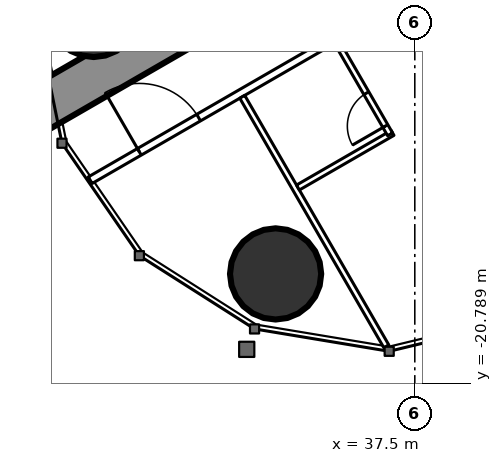
"""IFC4 building model, lengths in metres.
Left out: names, types, materials, properties, quantities, classifications, styles, units other than length and angle.
Written with IfcOpenShell. Run it as: python <this file> out.ifc"""

import sys

from ifc_helpers import new_model, si_unit, direction, frame, frame_2d, origin, origin_2d, place, context, subcontext, project, spatial, rectangle, circle, extrude, element, fill, save


model = new_model("IFC4")
c1 = context("Model", 3, precision=1e-05, world=origin(), true_north=direction((0.0, 1.0)))
c2 = subcontext(c1, "Body", "Model", "MODEL_VIEW")
j1 = project(units=[si_unit("LENGTHUNIT", "METRE"), si_unit("PLANEANGLEUNIT", "RADIAN")], contexts=[c1])
p1 = place(None, origin())
s1 = spatial("IfcSite", under=j1, at=p1, CompositionType="ELEMENT")
p2 = place(p1, origin())
s2 = spatial("IfcBuilding", under=s1, at=p2, CompositionType="ELEMENT")
p3 = place(p2, frame((0.0, 0.0, 236.9)))
s3 = spatial("IfcBuildingStorey", under=s2, at=p3, CompositionType="ELEMENT", Elevation=236.9)
for number, where, z_axis, x_axis in (
    (1, (33.837, -17.906, 0.0), (0.0, 0.0, 1.0), (1.0, 0.0, 0.0)),
    (2, (29.05, -11.0, 0.0), (0.0, 0.0, 1.0), (1.0, 0.0, 0.0)),
):
    element("IfcColumn", number, at=place(p3, frame(where, z_axis=z_axis, x_axis=x_axis)), inside=s3, PredefinedType="COLUMN", context=c2, shape_type="SweptSolid", body=[
        extrude(circle(Radius=1.2, at=origin_2d()), origin(), (0.0, 0.0, 1.0), 3.6),
    ])
p4 = place(p3, frame((27.2, -13.8, 0.0), z_axis=(0.0, 0.0, 1.0), x_axis=(0.866027159892, 0.499996958321, 0.0)))
e3 = element("IfcWall", 3, at=p4, inside=s3, PredefinedType="SHEAR", context=c2, shape_type="SweptSolid", body=[
    extrude(rectangle(XDim=27.947, YDim=1.2, at=frame_2d((13.973, 0.0))), origin(), (0.0, 0.0, 1.0), 3.6),
])
p5 = place(p4, frame((4.6, 0.0, 0.0)))
e4 = element("IfcOpeningElement", 4, at=p5, cuts=e3, PredefinedType="OPENING", context=c2, shape_type="SweptSolid", body=[
    extrude(rectangle(XDim=1.0, YDim=2.2, at=frame_2d((0.5, 1.1))), frame((0.0, 0.61, 0.0), z_axis=(0.0, -1.0, 0.0), x_axis=(1.0, 0.0, 0.0)), (0.0, 0.0, 1.0), 1.22),
])
p6 = place(p4, frame((13.395, 0.0, 0.0)))
e5 = element("IfcOpeningElement", 5, at=p6, cuts=e3, PredefinedType="OPENING", context=c2, shape_type="SweptSolid", body=[
    extrude(rectangle(XDim=1.8, YDim=2.2, at=frame_2d((0.9, 1.1))), frame((0.0, 0.61, 0.0), z_axis=(0.0, -1.0, 0.0), x_axis=(1.0, 0.0, 0.0)), (0.0, 0.0, 1.0), 1.22),
])
p7 = place(p3, frame((28.959, -15.44, 0.0), z_axis=(0.0, 0.0, 1.0), x_axis=(0.866025227435, 0.500000305447, 0.0)))
e6 = element("IfcWall", 6, at=p7, inside=s3, PredefinedType="PARTITIONING", context=c2, shape_type="SweptSolid", body=[
    extrude(rectangle(XDim=30.88, YDim=0.2, at=frame_2d((15.44, 0.0))), origin(), (0.0, 0.0, 1.0), 3.35),
])
p8 = place(p7, frame((1.494, 0.0, 0.0)))
e7 = element("IfcOpeningElement", 7, at=p8, cuts=e6, PredefinedType="OPENING", context=c2, shape_type="SweptSolid", body=[
    extrude(rectangle(XDim=1.8, YDim=2.03, at=frame_2d((0.9, 1.015))), frame((0.0, 0.11, 0.0), z_axis=(0.0, -1.0, 0.0), x_axis=(1.0, 0.0, 0.0)), (0.0, 0.0, 1.0), 0.22),
])
p9 = place(p7, frame((7.687, 0.0, 0.0)))
e8 = element("IfcOpeningElement", 8, at=p9, cuts=e6, PredefinedType="OPENING", context=c2, shape_type="SweptSolid", body=[
    extrude(rectangle(XDim=1.0, YDim=2.2, at=frame_2d((0.5, 1.1))), frame((0.0, 0.11, 0.0), z_axis=(0.0, -1.0, 0.0), x_axis=(1.0, 0.0, 0.0)), (0.0, 0.0, 1.0), 0.22),
])
p10 = place(p7, frame((16.137, 0.0, 0.0)))
e9 = element("IfcOpeningElement", 9, at=p10, cuts=e6, PredefinedType="OPENING", context=c2, shape_type="SweptSolid", body=[
    extrude(rectangle(XDim=0.95, YDim=2.2, at=frame_2d((0.475, 1.1))), frame((0.0, 0.11, 0.0), z_axis=(0.0, -1.0, 0.0), x_axis=(1.0, 0.0, 0.0)), (0.0, 0.0, 1.0), 0.22),
])
p11 = place(p7, frame((20.021, 0.0, 0.0)))
e10 = element("IfcOpeningElement", 10, at=p11, cuts=e6, PredefinedType="OPENING", context=c2, shape_type="SweptSolid", body=[
    extrude(rectangle(XDim=0.95, YDim=2.2, at=frame_2d((0.475, 1.1))), frame((0.0, 0.11, 0.0), z_axis=(0.0, -1.0, 0.0), x_axis=(1.0, 0.0, 0.0)), (0.0, 0.0, 1.0), 0.22),
])
p12 = place(p7, frame((26.253, 0.0, 0.0)))
e11 = element("IfcOpeningElement", 11, at=p12, cuts=e6, PredefinedType="OPENING", context=c2, shape_type="SweptSolid", body=[
    extrude(rectangle(XDim=0.95, YDim=2.2, at=frame_2d((0.475, 1.1))), frame((0.0, 0.11, 0.0), z_axis=(0.0, -1.0, 0.0), x_axis=(1.0, 0.0, 0.0)), (0.0, 0.0, 1.0), 0.22),
])
p13 = place(p3, frame((32.96, -13.246, 0.0), z_axis=(0.0, 0.0, 1.0), x_axis=(0.500000236886, -0.866025267018, 0.0)))
e12 = element("IfcWall", 12, at=p13, inside=s3, PredefinedType="PARTITIONING", context=c2, shape_type="SweptSolid", body=[
    extrude(rectangle(XDim=7.583, YDim=0.15, at=frame_2d((3.791, 0.0))), origin(), (0.0, 0.0, 1.0), 3.35),
])
p14 = place(p3, frame((34.425, -15.633, 0.0), z_axis=(0.0, 0.0, 1.0), x_axis=(0.866018712932, 0.500011588718, 0.0)))
e13 = element("IfcWall", 13, at=p14, inside=s3, PredefinedType="PARTITIONING", context=c2, shape_type="SweptSolid", body=[
    extrude(rectangle(XDim=2.875, YDim=0.15, at=frame_2d((1.438, 0.0))), origin(), (0.0, 0.0, 1.0), 3.35),
])
p15 = place(p3, frame((35.45, -11.808, 0.0), z_axis=(0.0, 0.0, 1.0), x_axis=(0.49994636267, -0.866056369097, 0.0)))
e14 = element("IfcWall", 14, at=p15, inside=s3, PredefinedType="PARTITIONING", context=c2, shape_type="SweptSolid", body=[
    extrude(rectangle(XDim=2.8, YDim=0.15, at=frame_2d((1.4, 0.0))), origin(), (0.0, 0.0, 1.0), 3.35),
])
p16 = place(p15, frame((1.55, 0.0, 0.0)))
e15 = element("IfcOpeningElement", 15, at=p16, cuts=e14, PredefinedType="OPENING", context=c2, shape_type="SweptSolid", body=[
    extrude(rectangle(XDim=1.0, YDim=2.2, at=frame_2d((0.5, 1.1))), frame((0.0, 0.085, 0.0), z_axis=(0.0, -1.0, 0.0), x_axis=(1.0, 0.0, 0.0)), (0.0, 0.0, 1.0), 0.17),
])
p17 = place(p8, origin())
e16 = element("IfcDoor", 16, at=p17, inside=s3, OperationType="DOUBLE_DOOR_SINGLE_SWING", PredefinedType="DOOR", context=c2, shape_type="SweptSolid", body=[
    extrude(rectangle(XDim=1.8, YDim=2.03, at=frame_2d((0.9, 1.015))), frame((0.0, 0.025, 0.0), z_axis=(0.0, -1.0, 0.0), x_axis=(1.0, 0.0, 0.0)), (0.0, 0.0, 1.0), 0.05),
])
fill(e7, e16)
p18 = place(p16, origin())
e17 = element("IfcDoor", 17, at=p18, inside=s3, OperationType="SINGLE_SWING_RIGHT", PredefinedType="DOOR", context=c2, shape_type="SweptSolid", body=[
    extrude(rectangle(XDim=1.0, YDim=2.2, at=frame_2d((0.5, 1.1))), frame((0.0, 0.025, 0.0), z_axis=(0.0, -1.0, 0.0), x_axis=(1.0, 0.0, 0.0)), (0.0, 0.0, 1.0), 0.05),
])
fill(e15, e17)
save(model, sys.argv[1])
